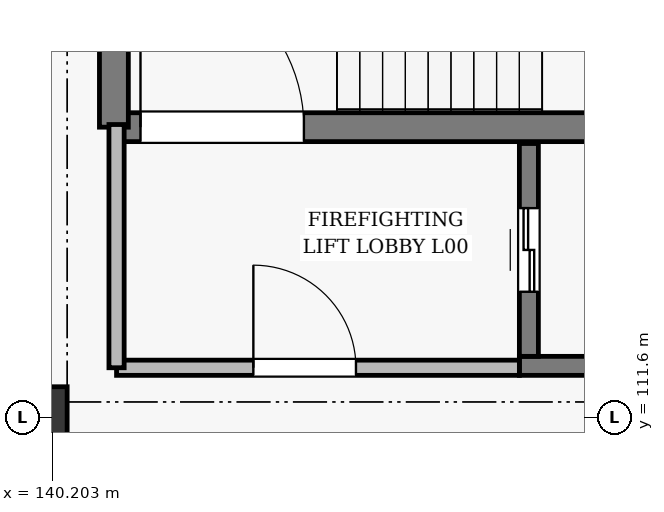
"""IFC4 building model, lengths in metres.
Left out: names, types, materials, properties, quantities, classifications, styles, units other than length and angle.
Written with IfcOpenShell. Run it as: python <this file> out.ifc"""

import sys

from ifc_helpers import new_model, si_unit, direction, frame, frame_2d, origin, origin_2d, place, context, subcontext, project, spatial, rectangle, extrude, element, fill, save


model = new_model("IFC4")
c1 = context("Model", 3, precision=1e-05, world=origin(), true_north=direction((0.0, 1.0)))
c2 = subcontext(c1, "Body", "Model", "MODEL_VIEW")
j1 = project(units=[si_unit("LENGTHUNIT", "METRE"), si_unit("PLANEANGLEUNIT", "RADIAN")], contexts=[c1])
p1 = place(None, origin())
s1 = spatial("IfcSite", under=j1, at=p1, CompositionType="ELEMENT")
p2 = place(p1, origin())
s2 = spatial("IfcBuilding", under=s1, at=p2, CompositionType="ELEMENT")
p3 = place(p2, origin())
s3 = spatial("IfcBuildingStorey", under=s2, at=p3, CompositionType="ELEMENT", Elevation=0.0)
p4 = place(p3, frame((140.0, 111.6, 0.0), z_axis=(0.0, 0.0, 1.0), x_axis=(1.0, 0.0, 0.0)))
e1 = element("IfcColumn", 1, at=p4, inside=s3, PredefinedType="COLUMN", context=c2, shape_type="SweptSolid", body=[
    extrude(rectangle(XDim=0.8, YDim=0.8, at=origin_2d()), origin(), (0.0, 0.0, 1.0), 6.6),
])
p5 = place(p3, frame((141.015, 115.415, 0.0), z_axis=(0.0, 0.0, 1.0), x_axis=(1.0, 0.0, 0.0)))
e2 = element("IfcWall", 2, at=p5, inside=s3, PredefinedType="SOLIDWALL", context=c2, shape_type="SweptSolid", body=[
    extrude(rectangle(XDim=10.17, YDim=0.38, at=frame_2d((5.085, 0.0))), origin(), (0.0, 0.0, 1.0), 6.6),
])
p6 = place(p5, frame((0.35, 0.0, 0.005)))
e3 = element("IfcOpeningElement", 3, at=p6, cuts=e2, PredefinedType="OPENING", context=c2, shape_type="SweptSolid", body=[
    extrude(rectangle(XDim=2.15, YDim=2.2, at=frame_2d((1.075, 1.1))), frame((0.0, 0.202, 0.0), z_axis=(0.0, -1.0, 0.0), x_axis=(1.0, 0.0, 0.0)), (0.0, 0.0, 1.0), 0.404),
])
p7 = place(p3, frame((141.015, 115.415, 0.0), z_axis=(0.0, 0.0, 1.0), x_axis=(0.0, 1.0, 0.0)))
e4 = element("IfcWall", 4, at=p7, inside=s3, PredefinedType="SOLIDWALL", context=c2, shape_type="SweptSolid", body=[
    extrude(rectangle(XDim=4.47, YDim=0.38, at=frame_2d((2.235, 0.0))), origin(), (0.0, 0.0, 1.0), 6.6),
])
p8 = place(p3, frame((146.35, 112.275, 0.0), z_axis=(0.0, 0.0, 1.0), x_axis=(1.0, 0.0, 0.0)))
e5 = element("IfcWall", 5, at=p8, inside=s3, PredefinedType="SOLIDWALL", context=c2, shape_type="SweptSolid", body=[
    extrude(rectangle(XDim=3.5, YDim=0.25, at=frame_2d((1.75, 0.0))), origin(), (0.0, 0.0, 1.0), 6.6),
])
p9 = place(p3, frame((146.475, 112.4, 0.0), z_axis=(0.0, 0.0, 1.0), x_axis=(0.0, 1.0, 0.0)))
e6 = element("IfcWall", 6, at=p9, inside=s3, PredefinedType="SOLIDWALL", context=c2, shape_type="SweptSolid", body=[
    extrude(rectangle(XDim=2.8, YDim=0.25, at=frame_2d((1.4, 0.0))), origin(), (0.0, 0.0, 1.0), 6.6),
])
p10 = place(p9, frame((0.85, 0.0, 0.005)))
e7 = element("IfcOpeningElement", 7, at=p10, cuts=e6, PredefinedType="OPENING", context=c2, shape_type="SweptSolid", body=[
    extrude(rectangle(XDim=1.1, YDim=2.15, at=frame_2d((0.55, 1.075))), frame((0.0, 0.137, 0.0), z_axis=(0.0, -1.0, 0.0), x_axis=(1.0, 0.0, 0.0)), (0.0, 0.0, 1.0), 0.274),
])
p11 = place(p3, frame((141.05, 112.25, 0.0), z_axis=(0.0, 0.0, 1.0), x_axis=(1.0, 0.0, 0.0)))
e8 = element("IfcWall", 8, at=p11, inside=s3, PredefinedType="PARTITIONING", context=c2, shape_type="SweptSolid", body=[
    extrude(rectangle(XDim=5.3, YDim=0.2, at=frame_2d((2.65, 0.0))), origin(), (0.0, 0.0, 1.0), 6.0),
])
p12 = place(p11, frame((1.8, 0.0, 0.005)))
e9 = element("IfcOpeningElement", 9, at=p12, cuts=e8, PredefinedType="OPENING", context=c2, shape_type="SweptSolid", body=[
    extrude(rectangle(XDim=1.35, YDim=2.15, at=frame_2d((0.675, 1.075))), frame((0.0, 0.112, 0.0), z_axis=(0.0, -1.0, 0.0), x_axis=(1.0, 0.0, 0.0)), (0.0, 0.0, 1.0), 0.224),
])
p13 = place(p3, frame((141.05, 112.25, 0.0), z_axis=(0.0, 0.0, 1.0), x_axis=(0.0, 1.0, 0.0)))
e10 = element("IfcWall", 10, at=p13, inside=s3, PredefinedType="PARTITIONING", context=c2, shape_type="SweptSolid", body=[
    extrude(rectangle(XDim=3.2, YDim=0.2, at=frame_2d((1.6, 0.0))), origin(), (0.0, 0.0, 1.0), 6.0),
])
p14 = place(p6, origin())
e11 = element("IfcDoor", 11, at=p14, inside=s3, OperationType="SINGLE_SWING_LEFT", PredefinedType="DOOR", context=c2, shape_type="SweptSolid", body=[
    extrude(rectangle(XDim=2.15, YDim=2.2, at=frame_2d((1.075, 1.1))), frame((0.0, 0.025, 0.0), z_axis=(0.0, -1.0, 0.0), x_axis=(1.0, 0.0, 0.0)), (0.0, 0.0, 1.0), 0.05),
])
fill(e3, e11)
p15 = place(p10, origin())
e12 = element("IfcDoor", 12, at=p15, inside=s3, OperationType="SLIDING_TO_LEFT", PredefinedType="DOOR", context=c2, shape_type="SweptSolid", body=[
    extrude(rectangle(XDim=1.1, YDim=2.15, at=frame_2d((0.55, 1.075))), frame((0.0, 0.025, 0.0), z_axis=(0.0, -1.0, 0.0), x_axis=(1.0, 0.0, 0.0)), (0.0, 0.0, 1.0), 0.05),
])
fill(e7, e12)
p16 = place(p12, origin())
e13 = element("IfcDoor", 13, at=p16, inside=s3, OperationType="SINGLE_SWING_LEFT", PredefinedType="DOOR", context=c2, shape_type="SweptSolid", body=[
    extrude(rectangle(XDim=1.35, YDim=2.15, at=frame_2d((0.675, 1.075))), frame((0.0, 0.025, 0.0), z_axis=(0.0, -1.0, 0.0), x_axis=(1.0, 0.0, 0.0)), (0.0, 0.0, 1.0), 0.05),
])
fill(e9, e13)
save(model, sys.argv[1])
